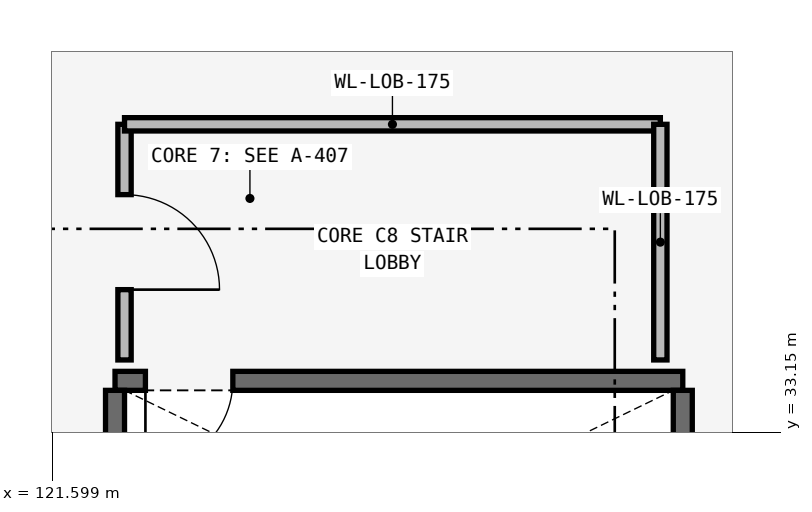
"""IFC4 building model, lengths in metres.
Left out: names, types, materials, properties, quantities, classifications, styles, units other than length and angle.
Written with IfcOpenShell. Run it as: python <this file> out.ifc"""

import sys

from ifc_helpers import new_model, si_unit, direction, frame, frame_2d, origin, place, context, subcontext, project, spatial, rectangle, extrude, element, fill, save


model = new_model("IFC4")
c1 = context("Model", 3, precision=1e-05, world=origin(), true_north=direction((0.0, 1.0)))
c2 = subcontext(c1, "Body", "Model", "MODEL_VIEW")
j1 = project(units=[si_unit("LENGTHUNIT", "METRE"), si_unit("PLANEANGLEUNIT", "RADIAN")], contexts=[c1])
p1 = place(None, origin())
s1 = spatial("IfcSite", under=j1, at=p1, CompositionType="ELEMENT")
p2 = place(p1, origin())
s2 = spatial("IfcBuilding", under=s1, at=p2, CompositionType="ELEMENT")
p3 = place(p2, frame((0.0, 0.0, 5.4)))
s3 = spatial("IfcBuildingStorey", under=s2, at=p3, CompositionType="ELEMENT", Elevation=5.4)
p4 = place(p3, frame((122.425, 33.825, 0.0), z_axis=(0.0, 0.0, 1.0), x_axis=(1.0, 0.0, 0.0)))
e1 = element("IfcWall", 1, at=p4, inside=s3, PredefinedType="SHEAR", context=c2, shape_type="SweptSolid", body=[
    extrude(rectangle(XDim=7.47, YDim=0.25, at=frame_2d((3.735, 0.0))), origin(), (0.0, 0.0, 1.0), 4.52),
])
p5 = place(p4, frame((0.4, 0.0, 0.0)))
e2 = element("IfcOpeningElement", 2, at=p5, cuts=e1, PredefinedType="OPENING", context=c2, shape_type="SweptSolid", body=[
    extrude(rectangle(XDim=1.15, YDim=2.15, at=frame_2d((0.575, 1.075))), frame((0.0, 0.14, 0.0), z_axis=(0.0, -1.0, 0.0), x_axis=(1.0, 0.0, 0.0)), (0.0, 0.0, 1.0), 0.28),
])
for number, where, z_axis, x_axis in (
    (3, (122.425, 30.2, 0.0), (0.0, 0.0, 1.0), (0.0, 1.0, 0.0)),
    (4, (129.895, 30.2, 0.0), (0.0, 0.0, 1.0), (0.0, 1.0, 0.0)),
):
    element("IfcWall", number, at=place(p3, frame(where, z_axis=z_axis, x_axis=x_axis)), inside=s3, PredefinedType="SHEAR", context=c2, shape_type="SweptSolid", body=[
        extrude(rectangle(XDim=3.5, YDim=0.25, at=frame_2d((1.75, 0.0))), origin(), (0.0, 0.0, 1.0), 4.52),
    ])
p6 = place(p3, frame((122.55, 34.1, 0.0), z_axis=(0.0, 0.0, 1.0), x_axis=(0.0, 1.0, 0.0)))
e5 = element("IfcWall", 5, at=p6, inside=s3, PredefinedType="PARTITIONING", context=c2, shape_type="SweptSolid", body=[
    extrude(rectangle(XDim=3.1, YDim=0.175, at=frame_2d((1.55, 0.0))), origin(), (0.0, 0.0, 1.0), 4.52),
])
p7 = place(p6, frame((0.925, 0.0, 0.0)))
e6 = element("IfcOpeningElement", 6, at=p7, cuts=e5, PredefinedType="OPENING", context=c2, shape_type="SweptSolid", body=[
    extrude(rectangle(XDim=1.25, YDim=2.2, at=frame_2d((0.625, 1.1))), frame((0.0, 0.103, 0.0), z_axis=(0.0, -1.0, 0.0), x_axis=(1.0, 0.0, 0.0)), (0.0, 0.0, 1.0), 0.205),
])
p8 = place(p3, frame((122.55, 37.2, 0.0), z_axis=(0.0, 0.0, 1.0), x_axis=(1.0, 0.0, 0.0)))
e7 = element("IfcWall", 7, at=p8, inside=s3, PredefinedType="PARTITIONING", context=c2, shape_type="SweptSolid", body=[
    extrude(rectangle(XDim=7.05, YDim=0.175, at=frame_2d((3.525, 0.0))), origin(), (0.0, 0.0, 1.0), 4.52),
])
p9 = place(p3, frame((129.6, 34.1, 0.0), z_axis=(0.0, 0.0, 1.0), x_axis=(0.0, 1.0, 0.0)))
e8 = element("IfcWall", 8, at=p9, inside=s3, PredefinedType="PARTITIONING", context=c2, shape_type="SweptSolid", body=[
    extrude(rectangle(XDim=3.1, YDim=0.175, at=frame_2d((1.55, 0.0))), origin(), (0.0, 0.0, 1.0), 4.52),
])
p10 = place(p5, frame((1.15, 0.0, 0.0), z_axis=(0.0, 0.0, 1.0), x_axis=(-1.0, 0.0, 0.0)))
e9 = element("IfcDoor", 9, at=p10, inside=s3, OperationType="SINGLE_SWING_LEFT", PredefinedType="DOOR", context=c2, shape_type="SweptSolid", body=[
    extrude(rectangle(XDim=1.15, YDim=2.15, at=frame_2d((0.575, 1.075))), frame((0.0, 0.025, 0.0), z_axis=(0.0, -1.0, 0.0), x_axis=(1.0, 0.0, 0.0)), (0.0, 0.0, 1.0), 0.05),
])
fill(e2, e9)
p11 = place(p7, frame((1.25, 0.0, 0.0), z_axis=(0.0, 0.0, 1.0), x_axis=(-1.0, 0.0, 0.0)))
e10 = element("IfcDoor", 10, at=p11, inside=s3, OperationType="SINGLE_SWING_LEFT", PredefinedType="DOOR", context=c2, shape_type="SweptSolid", body=[
    extrude(rectangle(XDim=1.25, YDim=2.2, at=frame_2d((0.625, 1.1))), frame((0.0, 0.025, 0.0), z_axis=(0.0, -1.0, 0.0), x_axis=(1.0, 0.0, 0.0)), (0.0, 0.0, 1.0), 0.05),
])
fill(e6, e10)
save(model, sys.argv[1])
